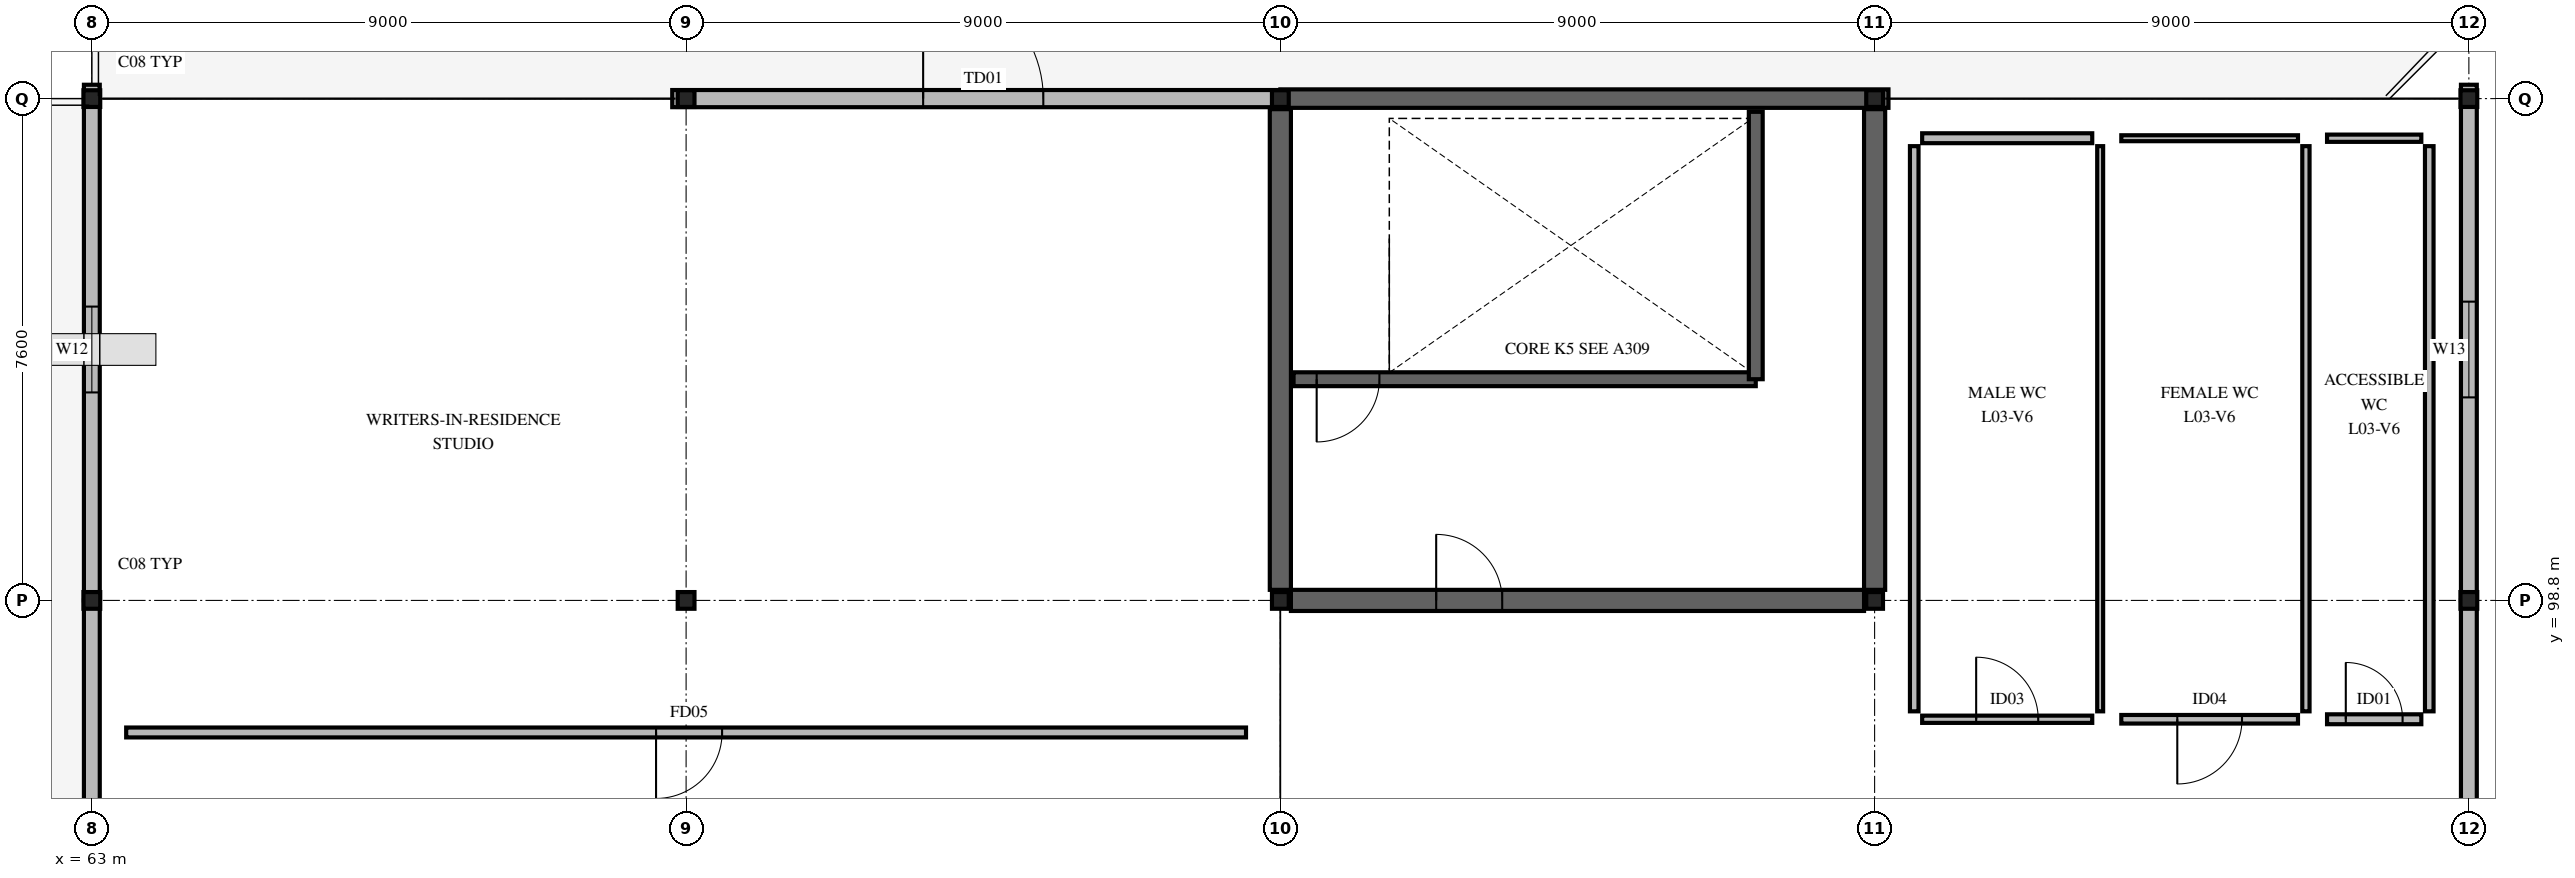
"""IFC4 building model, lengths in metres.
Left out: names, types, materials, properties, quantities, classifications, styles, units other than length and angle.
Written with IfcOpenShell. Run it as: python <this file> out.ifc"""

import sys

from ifc_helpers import new_model, si_unit, direction, frame, frame_2d, origin, origin_2d, place, context, subcontext, project, spatial, rectangle, i_section, extrude, element, fill, save


model = new_model("IFC4")
c1 = context("Model", 3, precision=1e-05, world=origin(), true_north=direction((0.0, 1.0)))
c2 = subcontext(c1, "Body", "Model", "MODEL_VIEW")
j1 = project(units=[si_unit("LENGTHUNIT", "METRE"), si_unit("PLANEANGLEUNIT", "RADIAN")], contexts=[c1])
p1 = place(None, origin())
s1 = spatial("IfcSite", under=j1, at=p1, CompositionType="ELEMENT")
p2 = place(p1, origin())
s2 = spatial("IfcBuilding", under=s1, at=p2, CompositionType="ELEMENT")
p3 = place(p2, frame((0.0, 0.0, 13.68)))
s3 = spatial("IfcBuildingStorey", under=s2, at=p3, CompositionType="ELEMENT", Elevation=13.68)
p4 = place(p3, frame((63.0, 98.8, 0.0), z_axis=(0.0, 0.0, 1.0), x_axis=(1.0, 0.0, 0.0)))
e1 = element("IfcColumn", 1, at=p4, inside=s3, PredefinedType="COLUMN", context=c2, shape_type="SweptSolid", body=[
    extrude(i_section(OverallWidth=0.254, OverallDepth=0.253, WebThickness=0.009, FlangeThickness=0.014, FilletRadius=0.012, at=origin_2d()), origin(), (0.0, 0.0, 1.0), 4.32),
])
p5 = place(p3, frame((63.0, 106.4, 0.0), z_axis=(0.0, 0.0, 1.0), x_axis=(1.0, 0.0, 0.0)))
e2 = element("IfcColumn", 2, at=p5, inside=s3, PredefinedType="COLUMN", context=c2, shape_type="SweptSolid", body=[
    extrude(i_section(OverallWidth=0.254, OverallDepth=0.253, WebThickness=0.009, FlangeThickness=0.014, FilletRadius=0.012, at=origin_2d()), origin(), (0.0, 0.0, 1.0), 7.47),
])
p6 = place(p3, frame((72.0, 98.8, 0.0), z_axis=(0.0, 0.0, 1.0), x_axis=(1.0, 0.0, 0.0)))
e3 = element("IfcColumn", 3, at=p6, inside=s3, PredefinedType="COLUMN", context=c2, shape_type="SweptSolid", body=[
    extrude(i_section(OverallWidth=0.254, OverallDepth=0.253, WebThickness=0.009, FlangeThickness=0.014, FilletRadius=0.012, at=origin_2d()), origin(), (0.0, 0.0, 1.0), 4.32),
])
p7 = place(p3, frame((72.0, 106.4, 0.0), z_axis=(0.0, 0.0, 1.0), x_axis=(1.0, 0.0, 0.0)))
e4 = element("IfcColumn", 4, at=p7, inside=s3, PredefinedType="COLUMN", context=c2, shape_type="SweptSolid", body=[
    extrude(i_section(OverallWidth=0.254, OverallDepth=0.253, WebThickness=0.009, FlangeThickness=0.014, FilletRadius=0.012, at=origin_2d()), origin(), (0.0, 0.0, 1.0), 7.47),
])
p8 = place(p3, frame((81.0, 98.8, 0.0), z_axis=(0.0, 0.0, 1.0), x_axis=(1.0, 0.0, 0.0)))
e5 = element("IfcColumn", 5, at=p8, inside=s3, PredefinedType="COLUMN", context=c2, shape_type="SweptSolid", body=[
    extrude(i_section(OverallWidth=0.254, OverallDepth=0.253, WebThickness=0.009, FlangeThickness=0.014, FilletRadius=0.012, at=origin_2d()), origin(), (0.0, 0.0, 1.0), 4.32),
])
p9 = place(p3, frame((81.0, 106.4, 0.0), z_axis=(0.0, 0.0, 1.0), x_axis=(1.0, 0.0, 0.0)))
e6 = element("IfcColumn", 6, at=p9, inside=s3, PredefinedType="COLUMN", context=c2, shape_type="SweptSolid", body=[
    extrude(i_section(OverallWidth=0.254, OverallDepth=0.253, WebThickness=0.009, FlangeThickness=0.014, FilletRadius=0.012, at=origin_2d()), origin(), (0.0, 0.0, 1.0), 7.47),
])
p10 = place(p3, frame((90.0, 98.8, 0.0), z_axis=(0.0, 0.0, 1.0), x_axis=(1.0, 0.0, 0.0)))
e7 = element("IfcColumn", 7, at=p10, inside=s3, PredefinedType="COLUMN", context=c2, shape_type="SweptSolid", body=[
    extrude(i_section(OverallWidth=0.254, OverallDepth=0.253, WebThickness=0.009, FlangeThickness=0.014, FilletRadius=0.012, at=origin_2d()), origin(), (0.0, 0.0, 1.0), 4.32),
])
p11 = place(p3, frame((90.0, 106.4, 0.0), z_axis=(0.0, 0.0, 1.0), x_axis=(1.0, 0.0, 0.0)))
e8 = element("IfcColumn", 8, at=p11, inside=s3, PredefinedType="COLUMN", context=c2, shape_type="SweptSolid", body=[
    extrude(i_section(OverallWidth=0.254, OverallDepth=0.253, WebThickness=0.009, FlangeThickness=0.014, FilletRadius=0.012, at=origin_2d()), origin(), (0.0, 0.0, 1.0), 7.47),
])
p12 = place(p3, frame((99.0, 98.8, 0.0), z_axis=(0.0, 0.0, 1.0), x_axis=(1.0, 0.0, 0.0)))
e9 = element("IfcColumn", 9, at=p12, inside=s3, PredefinedType="COLUMN", context=c2, shape_type="SweptSolid", body=[
    extrude(i_section(OverallWidth=0.254, OverallDepth=0.253, WebThickness=0.009, FlangeThickness=0.014, FilletRadius=0.012, at=origin_2d()), origin(), (0.0, 0.0, 1.0), 4.32),
])
p13 = place(p3, frame((99.0, 106.4, 0.0), z_axis=(0.0, 0.0, 1.0), x_axis=(1.0, 0.0, 0.0)))
e10 = element("IfcColumn", 10, at=p13, inside=s3, PredefinedType="COLUMN", context=c2, shape_type="SweptSolid", body=[
    extrude(i_section(OverallWidth=0.254, OverallDepth=0.253, WebThickness=0.009, FlangeThickness=0.014, FilletRadius=0.012, at=origin_2d()), origin(), (0.0, 0.0, 1.0), 7.47),
])
p14 = place(p3, frame((71.79, 106.4, 0.0), z_axis=(0.0, 0.0, 1.0), x_axis=(1.0, 0.0, 0.0)))
e11 = element("IfcWall", 11, at=p14, inside=s3, PredefinedType="STANDARD", context=c2, shape_type="SweptSolid", body=[
    extrude(rectangle(XDim=9.21, YDim=0.26, at=frame_2d((4.605, 0.0))), origin(), (0.0, 0.0, 1.0), 4.08),
])
p15 = place(p14, frame((3.8, 0.0, 0.0)))
e12 = element("IfcOpeningElement", 12, at=p15, cuts=e11, PredefinedType="OPENING", context=c2, shape_type="SweptSolid", body=[
    extrude(rectangle(XDim=1.82, YDim=2.2, at=frame_2d((0.91, 1.1))), frame((0.0, 0.14, 0.0), z_axis=(0.0, -1.0, 0.0), x_axis=(1.0, 0.0, 0.0)), (0.0, 0.0, 1.0), 0.28),
])
p16 = place(p3, frame((81.0, 106.4, 0.0), z_axis=(0.0, 0.0, 1.0), x_axis=(1.0, 0.0, 0.0)))
e13 = element("IfcWall", 13, at=p16, inside=s3, PredefinedType="SOLIDWALL", context=c2, shape_type="SweptSolid", body=[
    extrude(rectangle(XDim=9.21, YDim=0.28, at=frame_2d((4.605, 0.0))), origin(), (0.0, 0.0, 1.0), 4.08),
])
p17 = place(p3, frame((63.0, 91.2, 0.0), z_axis=(0.0, 0.0, 1.0), x_axis=(0.0, 1.0, 0.0)))
e14 = element("IfcWall", 14, at=p17, inside=s3, PredefinedType="STANDARD", context=c2, shape_type="SweptSolid", body=[
    extrude(rectangle(XDim=7.6, YDim=0.24, at=frame_2d((3.8, 0.0))), origin(), (0.0, 0.0, 1.0), 3.78),
])
p18 = place(p17, frame((3.325, 0.0, 0.85)))
e15 = element("IfcOpeningElement", 15, at=p18, cuts=e14, PredefinedType="OPENING", context=c2, shape_type="SweptSolid", body=[
    extrude(rectangle(XDim=0.95, YDim=1.35, at=frame_2d((0.475, 0.675))), frame((0.0, 0.13, 0.0), z_axis=(0.0, -1.0, 0.0), x_axis=(1.0, 0.0, 0.0)), (0.0, 0.0, 1.0), 0.26),
])
p19 = place(p3, frame((99.0, 91.2, 0.0), z_axis=(0.0, 0.0, 1.0), x_axis=(0.0, 1.0, 0.0)))
e16 = element("IfcWall", 16, at=p19, inside=s3, PredefinedType="STANDARD", context=c2, shape_type="SweptSolid", body=[
    extrude(rectangle(XDim=7.6, YDim=0.24, at=frame_2d((3.8, 0.0))), origin(), (0.0, 0.0, 1.0), 3.78),
])
p20 = place(p19, frame((3.225, 0.0, 0.85)))
e17 = element("IfcOpeningElement", 17, at=p20, cuts=e16, PredefinedType="OPENING", context=c2, shape_type="SweptSolid", body=[
    extrude(rectangle(XDim=1.15, YDim=1.35, at=frame_2d((0.575, 0.675))), frame((0.0, 0.13, 0.0), z_axis=(0.0, -1.0, 0.0), x_axis=(1.0, 0.0, 0.0)), (0.0, 0.0, 1.0), 0.26),
])
p21 = place(p3, frame((63.0, 98.8, 0.0), z_axis=(0.0, 0.0, 1.0), x_axis=(0.0, 1.0, 0.0)))
e18 = element("IfcWall", 18, at=p21, inside=s3, PredefinedType="STANDARD", context=c2, shape_type="SweptSolid", body=[
    extrude(rectangle(XDim=7.81, YDim=0.24, at=frame_2d((3.905, 0.0))), origin(), (0.0, 0.0, 1.0), 3.78),
])
p22 = place(p21, frame((3.15, 0.0, 0.85)))
e19 = element("IfcOpeningElement", 19, at=p22, cuts=e18, PredefinedType="OPENING", context=c2, shape_type="SweptSolid", body=[
    extrude(rectangle(XDim=1.3, YDim=1.35, at=frame_2d((0.65, 0.675))), frame((0.0, 0.13, 0.0), z_axis=(0.0, -1.0, 0.0), x_axis=(1.0, 0.0, 0.0)), (0.0, 0.0, 1.0), 0.26),
])
p23 = place(p3, frame((99.0, 98.8, 0.0), z_axis=(0.0, 0.0, 1.0), x_axis=(0.0, 1.0, 0.0)))
e20 = element("IfcWall", 20, at=p23, inside=s3, PredefinedType="STANDARD", context=c2, shape_type="SweptSolid", body=[
    extrude(rectangle(XDim=7.81, YDim=0.24, at=frame_2d((3.905, 0.0))), origin(), (0.0, 0.0, 1.0), 3.78),
])
p24 = place(p23, frame((3.075, 0.0, 0.85)))
e21 = element("IfcOpeningElement", 21, at=p24, cuts=e20, PredefinedType="OPENING", context=c2, shape_type="SweptSolid", body=[
    extrude(rectangle(XDim=1.45, YDim=1.35, at=frame_2d((0.725, 0.675))), frame((0.0, 0.13, 0.0), z_axis=(0.0, -1.0, 0.0), x_axis=(1.0, 0.0, 0.0)), (0.0, 0.0, 1.0), 0.26),
])
p25 = place(p3, frame((81.16, 98.8, 0.0), z_axis=(0.0, 0.0, 1.0), x_axis=(1.0, 0.0, 0.0)))
e22 = element("IfcWall", 22, at=p25, inside=s3, PredefinedType="SHEAR", context=c2, shape_type="SweptSolid", body=[
    extrude(rectangle(XDim=8.68, YDim=0.32, at=frame_2d((4.34, 0.0))), origin(), (0.0, 0.0, 1.0), 4.04),
])
p26 = place(p25, frame((2.2, 0.0, 0.0)))
e23 = element("IfcOpeningElement", 23, at=p26, cuts=e22, PredefinedType="OPENING", context=c2, shape_type="SweptSolid", body=[
    extrude(rectangle(XDim=1.0, YDim=2.15, at=frame_2d((0.5, 1.075))), frame((0.0, 0.17, 0.0), z_axis=(0.0, -1.0, 0.0), x_axis=(1.0, 0.0, 0.0)), (0.0, 0.0, 1.0), 0.34),
])
for number, where, z_axis, x_axis in (
    (24, (81.0, 98.96, 0.0), (0.0, 0.0, 1.0), (0.0, 1.0, 0.0)),
    (25, (90.0, 98.96, 0.0), (0.0, 0.0, 1.0), (0.0, 1.0, 0.0)),
):
    element("IfcWall", number, at=place(p3, frame(where, z_axis=z_axis, x_axis=x_axis)), inside=s3, PredefinedType="SHEAR", context=c2, shape_type="SweptSolid", body=[
        extrude(rectangle(XDim=7.28, YDim=0.32, at=frame_2d((3.64, 0.0))), origin(), (0.0, 0.0, 1.0), 4.04),
    ])
p27 = place(p3, frame((81.2, 102.15, 0.0), z_axis=(0.0, 0.0, 1.0), x_axis=(1.0, 0.0, 0.0)))
e26 = element("IfcWall", 26, at=p27, inside=s3, PredefinedType="SOLIDWALL", context=c2, shape_type="SweptSolid", body=[
    extrude(rectangle(XDim=7.0, YDim=0.21, at=frame_2d((3.5, 0.0))), origin(), (0.0, 0.0, 1.0), 4.04),
])
p28 = place(p27, frame((0.35, 0.0, 0.0)))
e27 = element("IfcOpeningElement", 27, at=p28, cuts=e26, PredefinedType="OPENING", context=c2, shape_type="SweptSolid", body=[
    extrude(rectangle(XDim=0.95, YDim=2.12, at=frame_2d((0.475, 1.06))), frame((0.0, 0.115, 0.0), z_axis=(0.0, -1.0, 0.0), x_axis=(1.0, 0.0, 0.0)), (0.0, 0.0, 1.0), 0.23),
])
p29 = place(p3, frame((88.2, 102.15, 0.0), z_axis=(0.0, 0.0, 1.0), x_axis=(0.0, 1.0, 0.0)))
e28 = element("IfcWall", 28, at=p29, inside=s3, PredefinedType="SOLIDWALL", context=c2, shape_type="SweptSolid", body=[
    extrude(rectangle(XDim=4.05, YDim=0.21, at=frame_2d((2.025, 0.0))), origin(), (0.0, 0.0, 1.0), 4.04),
])
p30 = place(p3, frame((63.52, 96.8, 0.0), z_axis=(0.0, 0.0, 1.0), x_axis=(1.0, 0.0, 0.0)))
e29 = element("IfcWall", 29, at=p30, inside=s3, PredefinedType="PARTITIONING", context=c2, shape_type="SweptSolid", body=[
    extrude(rectangle(XDim=16.96, YDim=0.15, at=frame_2d((8.48, 0.0))), origin(), (0.0, 0.0, 1.0), 4.04),
])
p31 = place(p30, frame((8.025, 0.0, 0.0)))
e30 = element("IfcOpeningElement", 30, at=p31, cuts=e29, PredefinedType="OPENING", context=c2, shape_type="SweptSolid", body=[
    extrude(rectangle(XDim=1.0, YDim=2.15, at=frame_2d((0.5, 1.075))), frame((0.0, 0.085, 0.0), z_axis=(0.0, -1.0, 0.0), x_axis=(1.0, 0.0, 0.0)), (0.0, 0.0, 1.0), 0.17),
])
p32 = place(p3, frame((90.6, 97.12, 0.0), z_axis=(0.0, 0.0, 1.0), x_axis=(0.0, 1.0, 0.0)))
e31 = element("IfcWall", 31, at=p32, inside=s3, PredefinedType="PARTITIONING", context=c2, shape_type="SweptSolid", body=[
    extrude(rectangle(XDim=8.56, YDim=0.13, at=frame_2d((4.28, 0.0))), origin(), (0.0, 0.0, 1.0), 4.04),
])
p33 = place(p3, frame((90.72, 97.0, 0.0), z_axis=(0.0, 0.0, 1.0), x_axis=(1.0, 0.0, 0.0)))
e32 = element("IfcWall", 32, at=p33, inside=s3, PredefinedType="PARTITIONING", context=c2, shape_type="SweptSolid", body=[
    extrude(rectangle(XDim=2.576, YDim=0.11, at=frame_2d((1.288, 0.0))), origin(), (0.0, 0.0, 1.0), 4.04),
])
p34 = place(p33, frame((0.818, 0.0, 0.0)))
e33 = element("IfcOpeningElement", 33, at=p34, cuts=e32, PredefinedType="OPENING", context=c2, shape_type="SweptSolid", body=[
    extrude(rectangle(XDim=0.94, YDim=2.06, at=frame_2d((0.47, 1.03))), frame((0.0, 0.065, 0.0), z_axis=(0.0, -1.0, 0.0), x_axis=(1.0, 0.0, 0.0)), (0.0, 0.0, 1.0), 0.13),
])
p35 = place(p3, frame((93.416, 97.12, 0.0), z_axis=(0.0, 0.0, 1.0), x_axis=(0.0, 1.0, 0.0)))
e34 = element("IfcWall", 34, at=p35, inside=s3, PredefinedType="PARTITIONING", context=c2, shape_type="SweptSolid", body=[
    extrude(rectangle(XDim=8.56, YDim=0.09, at=frame_2d((4.28, 0.0))), origin(), (0.0, 0.0, 1.0), 4.04),
])
p36 = place(p3, frame((90.72, 105.8, 0.0), z_axis=(0.0, 0.0, 1.0), x_axis=(1.0, 0.0, 0.0)))
e35 = element("IfcWall", 35, at=p36, inside=s3, PredefinedType="PARTITIONING", context=c2, shape_type="SweptSolid", body=[
    extrude(rectangle(XDim=2.576, YDim=0.15, at=frame_2d((1.288, 0.0))), origin(), (0.0, 0.0, 1.0), 4.04),
])
p37 = place(p3, frame((93.736, 97.0, 0.0), z_axis=(0.0, 0.0, 1.0), x_axis=(1.0, 0.0, 0.0)))
e36 = element("IfcWall", 36, at=p37, inside=s3, PredefinedType="PARTITIONING", context=c2, shape_type="SweptSolid", body=[
    extrude(rectangle(XDim=2.676, YDim=0.13, at=frame_2d((1.338, 0.0))), origin(), (0.0, 0.0, 1.0), 4.04),
])
p38 = place(p37, frame((0.848, 0.0, 0.0)))
e37 = element("IfcOpeningElement", 37, at=p38, cuts=e36, PredefinedType="OPENING", context=c2, shape_type="SweptSolid", body=[
    extrude(rectangle(XDim=0.98, YDim=2.06, at=frame_2d((0.49, 1.03))), frame((0.0, 0.075, 0.0), z_axis=(0.0, -1.0, 0.0), x_axis=(1.0, 0.0, 0.0)), (0.0, 0.0, 1.0), 0.15),
])
p39 = place(p3, frame((96.532, 97.12, 0.0), z_axis=(0.0, 0.0, 1.0), x_axis=(0.0, 1.0, 0.0)))
e38 = element("IfcWall", 38, at=p39, inside=s3, PredefinedType="PARTITIONING", context=c2, shape_type="SweptSolid", body=[
    extrude(rectangle(XDim=8.56, YDim=0.11, at=frame_2d((4.28, 0.0))), origin(), (0.0, 0.0, 1.0), 4.04),
])
p40 = place(p3, frame((93.736, 105.8, 0.0), z_axis=(0.0, 0.0, 1.0), x_axis=(1.0, 0.0, 0.0)))
e39 = element("IfcWall", 39, at=p40, inside=s3, PredefinedType="PARTITIONING", context=c2, shape_type="SweptSolid", body=[
    extrude(rectangle(XDim=2.676, YDim=0.09, at=frame_2d((1.338, 0.0))), origin(), (0.0, 0.0, 1.0), 4.04),
])
p41 = place(p3, frame((96.852, 97.0, 0.0), z_axis=(0.0, 0.0, 1.0), x_axis=(1.0, 0.0, 0.0)))
e40 = element("IfcWall", 40, at=p41, inside=s3, PredefinedType="PARTITIONING", context=c2, shape_type="SweptSolid", body=[
    extrude(rectangle(XDim=1.428, YDim=0.15, at=frame_2d((0.714, 0.0))), origin(), (0.0, 0.0, 1.0), 4.04),
])
p42 = place(p41, frame((0.284, 0.0, 0.0)))
e41 = element("IfcOpeningElement", 41, at=p42, cuts=e40, PredefinedType="OPENING", context=c2, shape_type="SweptSolid", body=[
    extrude(rectangle(XDim=0.86, YDim=2.06, at=frame_2d((0.43, 1.03))), frame((0.0, 0.085, 0.0), z_axis=(0.0, -1.0, 0.0), x_axis=(1.0, 0.0, 0.0)), (0.0, 0.0, 1.0), 0.17),
])
p43 = place(p3, frame((98.4, 97.12, 0.0), z_axis=(0.0, 0.0, 1.0), x_axis=(0.0, 1.0, 0.0)))
e42 = element("IfcWall", 42, at=p43, inside=s3, PredefinedType="PARTITIONING", context=c2, shape_type="SweptSolid", body=[
    extrude(rectangle(XDim=8.56, YDim=0.13, at=frame_2d((4.28, 0.0))), origin(), (0.0, 0.0, 1.0), 4.04),
])
p44 = place(p3, frame((96.852, 105.8, 0.0), z_axis=(0.0, 0.0, 1.0), x_axis=(1.0, 0.0, 0.0)))
e43 = element("IfcWall", 43, at=p44, inside=s3, PredefinedType="PARTITIONING", context=c2, shape_type="SweptSolid", body=[
    extrude(rectangle(XDim=1.428, YDim=0.11, at=frame_2d((0.714, 0.0))), origin(), (0.0, 0.0, 1.0), 4.04),
])
p45 = place(p15, origin())
e44 = element("IfcDoor", 44, at=p45, inside=s3, OperationType="SINGLE_SWING_LEFT", PredefinedType="DOOR", context=c2, shape_type="SweptSolid", body=[
    extrude(rectangle(XDim=1.82, YDim=2.2, at=frame_2d((0.91, 1.1))), frame((0.0, 0.025, 0.0), z_axis=(0.0, -1.0, 0.0), x_axis=(1.0, 0.0, 0.0)), (0.0, 0.0, 1.0), 0.05),
])
fill(e12, e44)
p46 = place(p22, origin())
e45 = element("IfcWindow", 45, at=p46, inside=s3, PartitioningType="SINGLE_PANEL", PredefinedType="WINDOW", context=c2, shape_type="SweptSolid", body=[
    extrude(rectangle(XDim=1.3, YDim=1.35, at=frame_2d((0.65, 0.675))), frame((0.0, 0.03, 0.0), z_axis=(0.0, -1.0, 0.0), x_axis=(1.0, 0.0, 0.0)), (0.0, 0.0, 1.0), 0.06),
])
fill(e19, e45)
p47 = place(p24, origin())
e46 = element("IfcWindow", 46, at=p47, inside=s3, PartitioningType="SINGLE_PANEL", PredefinedType="WINDOW", context=c2, shape_type="SweptSolid", body=[
    extrude(rectangle(XDim=1.45, YDim=1.35, at=frame_2d((0.725, 0.675))), frame((0.0, 0.03, 0.0), z_axis=(0.0, -1.0, 0.0), x_axis=(1.0, 0.0, 0.0)), (0.0, 0.0, 1.0), 0.06),
])
fill(e21, e46)
p48 = place(p28, origin())
e47 = element("IfcDoor", 47, at=p48, inside=s3, OperationType="SINGLE_SWING_RIGHT", PredefinedType="DOOR", context=c2, shape_type="SweptSolid", body=[
    extrude(rectangle(XDim=0.95, YDim=2.12, at=frame_2d((0.475, 1.06))), frame((0.0, 0.025, 0.0), z_axis=(0.0, -1.0, 0.0), x_axis=(1.0, 0.0, 0.0)), (0.0, 0.0, 1.0), 0.05),
])
fill(e27, e47)
p49 = place(p26, origin())
e48 = element("IfcDoor", 48, at=p49, inside=s3, OperationType="SINGLE_SWING_LEFT", PredefinedType="DOOR", context=c2, shape_type="SweptSolid", body=[
    extrude(rectangle(XDim=1.0, YDim=2.15, at=frame_2d((0.5, 1.075))), frame((0.0, 0.025, 0.0), z_axis=(0.0, -1.0, 0.0), x_axis=(1.0, 0.0, 0.0)), (0.0, 0.0, 1.0), 0.05),
])
fill(e23, e48)
p50 = place(p31, origin())
e49 = element("IfcDoor", 49, at=p50, inside=s3, OperationType="SINGLE_SWING_RIGHT", PredefinedType="DOOR", context=c2, shape_type="SweptSolid", body=[
    extrude(rectangle(XDim=1.0, YDim=2.15, at=frame_2d((0.5, 1.075))), frame((0.0, 0.025, 0.0), z_axis=(0.0, -1.0, 0.0), x_axis=(1.0, 0.0, 0.0)), (0.0, 0.0, 1.0), 0.05),
])
fill(e30, e49)
p51 = place(p34, origin())
e50 = element("IfcDoor", 50, at=p51, inside=s3, OperationType="SINGLE_SWING_LEFT", PredefinedType="DOOR", context=c2, shape_type="SweptSolid", body=[
    extrude(rectangle(XDim=0.94, YDim=2.06, at=frame_2d((0.47, 1.03))), frame((0.0, 0.025, 0.0), z_axis=(0.0, -1.0, 0.0), x_axis=(1.0, 0.0, 0.0)), (0.0, 0.0, 1.0), 0.05),
])
fill(e33, e50)
p52 = place(p38, origin())
e51 = element("IfcDoor", 51, at=p52, inside=s3, OperationType="SINGLE_SWING_RIGHT", PredefinedType="DOOR", context=c2, shape_type="SweptSolid", body=[
    extrude(rectangle(XDim=0.98, YDim=2.06, at=frame_2d((0.49, 1.03))), frame((0.0, 0.025, 0.0), z_axis=(0.0, -1.0, 0.0), x_axis=(1.0, 0.0, 0.0)), (0.0, 0.0, 1.0), 0.05),
])
fill(e37, e51)
p53 = place(p42, origin())
e52 = element("IfcDoor", 52, at=p53, inside=s3, OperationType="SINGLE_SWING_LEFT", PredefinedType="DOOR", context=c2, shape_type="SweptSolid", body=[
    extrude(rectangle(XDim=0.86, YDim=2.06, at=frame_2d((0.43, 1.03))), frame((0.0, 0.025, 0.0), z_axis=(0.0, -1.0, 0.0), x_axis=(1.0, 0.0, 0.0)), (0.0, 0.0, 1.0), 0.05),
])
fill(e41, e52)
save(model, sys.argv[1])
